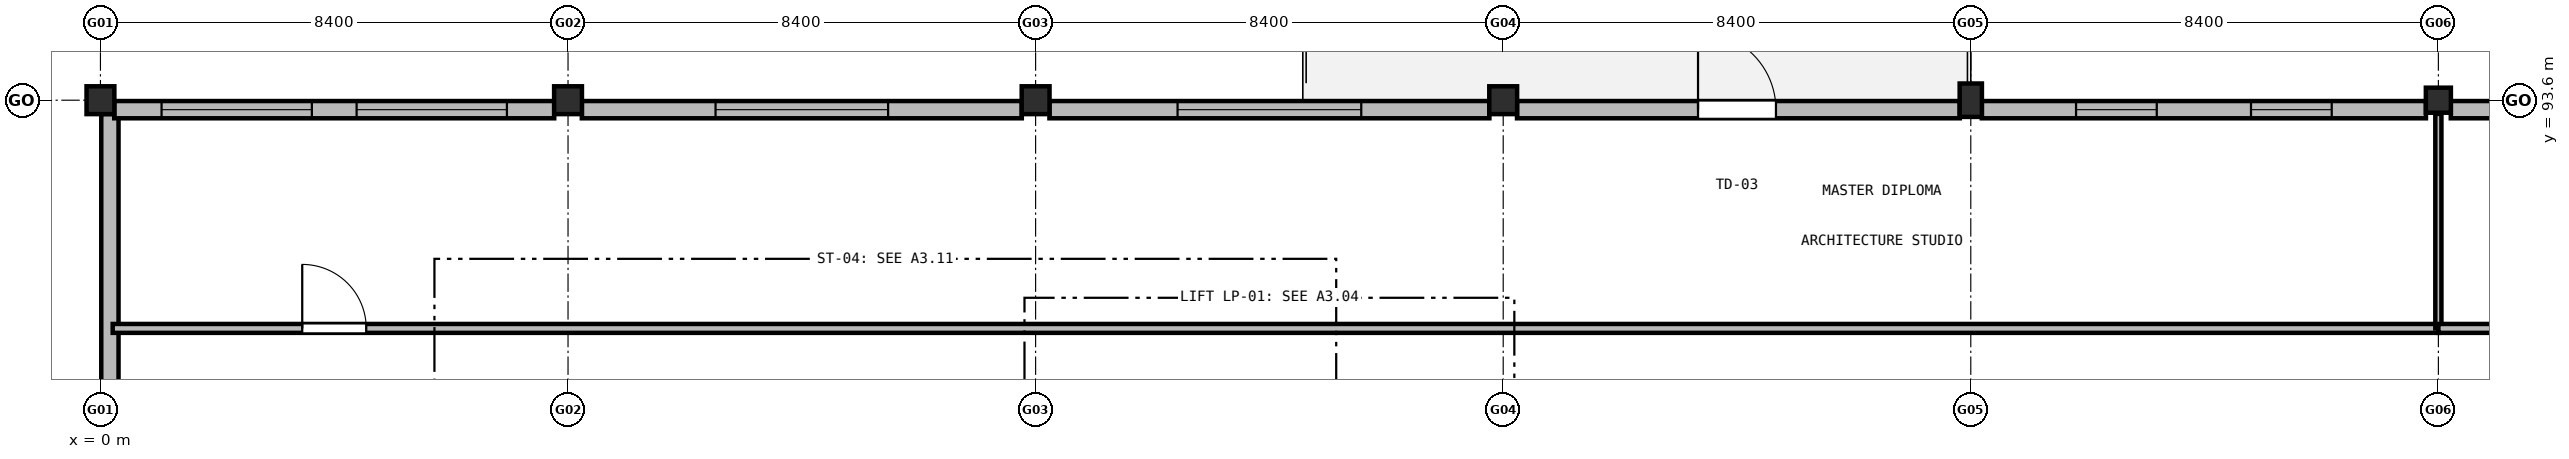
"""IFC4 building model, lengths in metres.
Left out: names, types, materials, properties, quantities, classifications, styles, units other than length and angle.
Written with IfcOpenShell. Run it as: python <this file> out.ifc"""

import sys

from ifc_helpers import new_model, si_unit, direction, frame, frame_2d, origin, origin_2d, place, context, subcontext, project, spatial, rectangle, extrude, element, fill, save


model = new_model("IFC4")
c1 = context("Model", 3, precision=1e-05, world=origin(), true_north=direction((0.0, 1.0)))
c2 = subcontext(c1, "Body", "Model", "MODEL_VIEW")
j1 = project(units=[si_unit("LENGTHUNIT", "METRE"), si_unit("PLANEANGLEUNIT", "RADIAN")], contexts=[c1])
p1 = place(None, origin())
s1 = spatial("IfcSite", under=j1, at=p1, CompositionType="ELEMENT")
p2 = place(p1, origin())
s2 = spatial("IfcBuilding", under=s1, at=p2, CompositionType="ELEMENT")
p3 = place(p2, frame((0.0, 0.0, 17.7)))
s3 = spatial("IfcBuildingStorey", under=s2, at=p3, CompositionType="ELEMENT", Elevation=17.7)
for number, where, z_axis, x_axis in (
    (1, (0.0, 93.6, 0.0), (0.0, 0.0, 1.0), (1.0, 0.0, 0.0)),
    (2, (8.4, 93.6, 0.0), (0.0, 0.0, 1.0), (1.0, 0.0, 0.0)),
    (3, (16.8, 93.6, 0.0), (0.0, 0.0, 1.0), (1.0, 0.0, 0.0)),
    (4, (25.2, 93.6, 0.0), (0.0, 0.0, 1.0), (1.0, 0.0, 0.0)),
):
    element("IfcColumn", number, at=place(p3, frame(where, z_axis=z_axis, x_axis=x_axis)), inside=s3, PredefinedType="COLUMN", context=c2, shape_type="SweptSolid", body=[
        extrude(rectangle(XDim=0.5, YDim=0.5, at=origin_2d()), origin(), (0.0, 0.0, 1.0), 4.2),
    ])
p4 = place(p3, frame((33.6, 93.6, 0.0), z_axis=(0.0, 0.0, 1.0), x_axis=(1.0, 0.0, 0.0)))
e5 = element("IfcColumn", 5, at=p4, inside=s3, PredefinedType="COLUMN", context=c2, shape_type="SweptSolid", body=[
    extrude(rectangle(XDim=0.4, YDim=0.6, at=origin_2d()), origin(), (0.0, 0.0, 1.0), 4.2),
])
p5 = place(p3, frame((42.0, 93.6, 0.0), z_axis=(0.0, 0.0, 1.0), x_axis=(1.0, 0.0, 0.0)))
e6 = element("IfcColumn", 6, at=p5, inside=s3, PredefinedType="COLUMN", context=c2, shape_type="SweptSolid", body=[
    extrude(rectangle(XDim=0.45, YDim=0.45, at=origin_2d()), origin(), (0.0, 0.0, 1.0), 4.2),
])
p6 = place(p3, frame((0.17, 86.648, 0.0), z_axis=(0.0, 0.0, 1.0), x_axis=(0.0, 1.0, 0.0)))
e7 = element("IfcWall", 7, at=p6, inside=s3, PredefinedType="SOLIDWALL", context=c2, shape_type="SweptSolid", body=[
    extrude(rectangle(XDim=6.704, YDim=0.31, at=frame_2d((3.352, 0.0))), origin(), (0.0, 0.0, 1.0), 3.36),
])
p7 = place(p3, frame((0.248, 93.43, 0.0), z_axis=(0.0, 0.0, 1.0), x_axis=(1.0, 0.0, 0.0)))
e8 = element("IfcWall", 8, at=p7, inside=s3, PredefinedType="SOLIDWALL", context=c2, shape_type="SweptSolid", body=[
    extrude(rectangle(XDim=7.904, YDim=0.31, at=frame_2d((3.952, 0.0))), origin(), (0.0, 0.0, 1.0), 3.25),
])
p8 = place(p7, frame((0.85, 0.0, 0.95)))
e9 = element("IfcOpeningElement", 9, at=p8, cuts=e8, PredefinedType="OPENING", context=c2, shape_type="SweptSolid", body=[
    extrude(rectangle(XDim=2.7, YDim=1.9, at=frame_2d((1.35, 0.95))), frame((0.0, 0.165, 0.0), z_axis=(0.0, -1.0, 0.0), x_axis=(1.0, 0.0, 0.0)), (0.0, 0.0, 1.0), 0.33),
])
p9 = place(p7, frame((4.354, 0.0, 0.95)))
e10 = element("IfcOpeningElement", 10, at=p9, cuts=e8, PredefinedType="OPENING", context=c2, shape_type="SweptSolid", body=[
    extrude(rectangle(XDim=2.7, YDim=1.9, at=frame_2d((1.35, 0.95))), frame((0.0, 0.165, 0.0), z_axis=(0.0, -1.0, 0.0), x_axis=(1.0, 0.0, 0.0)), (0.0, 0.0, 1.0), 0.33),
])
p10 = place(p3, frame((8.648, 93.43, 0.0), z_axis=(0.0, 0.0, 1.0), x_axis=(1.0, 0.0, 0.0)))
e11 = element("IfcWall", 11, at=p10, inside=s3, PredefinedType="SOLIDWALL", context=c2, shape_type="SweptSolid", body=[
    extrude(rectangle(XDim=7.904, YDim=0.31, at=frame_2d((3.952, 0.0))), origin(), (0.0, 0.0, 1.0), 3.25),
])
p11 = place(p10, frame((2.402, 0.0, 0.95)))
e12 = element("IfcOpeningElement", 12, at=p11, cuts=e11, PredefinedType="OPENING", context=c2, shape_type="SweptSolid", body=[
    extrude(rectangle(XDim=3.1, YDim=1.95, at=frame_2d((1.55, 0.975))), frame((0.0, 0.165, 0.0), z_axis=(0.0, -1.0, 0.0), x_axis=(1.0, 0.0, 0.0)), (0.0, 0.0, 1.0), 0.33),
])
p12 = place(p3, frame((17.048, 93.43, 0.0), z_axis=(0.0, 0.0, 1.0), x_axis=(1.0, 0.0, 0.0)))
e13 = element("IfcWall", 13, at=p12, inside=s3, PredefinedType="SOLIDWALL", context=c2, shape_type="SweptSolid", body=[
    extrude(rectangle(XDim=7.904, YDim=0.31, at=frame_2d((3.952, 0.0))), origin(), (0.0, 0.0, 1.0), 3.25),
])
p13 = place(p12, frame((2.302, 0.0, 0.95)))
e14 = element("IfcOpeningElement", 14, at=p13, cuts=e13, PredefinedType="OPENING", context=c2, shape_type="SweptSolid", body=[
    extrude(rectangle(XDim=3.3, YDim=1.65, at=frame_2d((1.65, 0.825))), frame((0.0, 0.165, 0.0), z_axis=(0.0, -1.0, 0.0), x_axis=(1.0, 0.0, 0.0)), (0.0, 0.0, 1.0), 0.33),
])
p14 = place(p3, frame((25.448, 93.43, 0.0), z_axis=(0.0, 0.0, 1.0), x_axis=(1.0, 0.0, 0.0)))
e15 = element("IfcWall", 15, at=p14, inside=s3, PredefinedType="SOLIDWALL", context=c2, shape_type="SweptSolid", body=[
    extrude(rectangle(XDim=7.954, YDim=0.31, at=frame_2d((3.977, 0.0))), origin(), (0.0, 0.0, 1.0), 3.25),
])
p15 = place(p14, frame((3.252, 0.0, 0.0)))
e16 = element("IfcOpeningElement", 16, at=p15, cuts=e15, PredefinedType="OPENING", context=c2, shape_type="SweptSolid", body=[
    extrude(rectangle(XDim=1.4, YDim=2.15, at=frame_2d((0.7, 1.075))), frame((0.0, 0.165, 0.0), z_axis=(0.0, -1.0, 0.0), x_axis=(1.0, 0.0, 0.0)), (0.0, 0.0, 1.0), 0.33),
])
p16 = place(p3, frame((33.798, 93.43, 0.0), z_axis=(0.0, 0.0, 1.0), x_axis=(1.0, 0.0, 0.0)))
e17 = element("IfcWall", 17, at=p16, inside=s3, PredefinedType="SOLIDWALL", context=c2, shape_type="SweptSolid", body=[
    extrude(rectangle(XDim=7.979, YDim=0.31, at=frame_2d((3.99, 0.0))), origin(), (0.0, 0.0, 1.0), 3.25),
])
p17 = place(p16, frame((1.693, 0.0, 0.95)))
e18 = element("IfcOpeningElement", 18, at=p17, cuts=e17, PredefinedType="OPENING", context=c2, shape_type="SweptSolid", body=[
    extrude(rectangle(XDim=1.45, YDim=1.85, at=frame_2d((0.725, 0.925))), frame((0.0, 0.165, 0.0), z_axis=(0.0, -1.0, 0.0), x_axis=(1.0, 0.0, 0.0)), (0.0, 0.0, 1.0), 0.33),
])
p18 = place(p16, frame((4.836, 0.0, 0.95)))
e19 = element("IfcOpeningElement", 19, at=p18, cuts=e17, PredefinedType="OPENING", context=c2, shape_type="SweptSolid", body=[
    extrude(rectangle(XDim=1.45, YDim=1.85, at=frame_2d((0.725, 0.925))), frame((0.0, 0.165, 0.0), z_axis=(0.0, -1.0, 0.0), x_axis=(1.0, 0.0, 0.0)), (0.0, 0.0, 1.0), 0.33),
])
p19 = place(p3, frame((42.223, 93.43, 0.0), z_axis=(0.0, 0.0, 1.0), x_axis=(1.0, 0.0, 0.0)))
e20 = element("IfcWall", 20, at=p19, inside=s3, PredefinedType="SOLIDWALL", context=c2, shape_type="SweptSolid", body=[
    extrude(rectangle(XDim=7.954, YDim=0.31, at=frame_2d((3.977, 0.0))), origin(), (0.0, 0.0, 1.0), 3.25),
])
p20 = place(p19, frame((1.051, 0.0, 0.95)))
e21 = element("IfcOpeningElement", 21, at=p20, cuts=e20, PredefinedType="OPENING", context=c2, shape_type="SweptSolid", body=[
    extrude(rectangle(XDim=2.4, YDim=2.05, at=frame_2d((1.2, 1.025))), frame((0.0, 0.165, 0.0), z_axis=(0.0, -1.0, 0.0), x_axis=(1.0, 0.0, 0.0)), (0.0, 0.0, 1.0), 0.33),
])
p21 = place(p19, frame((4.503, 0.0, 0.95)))
e22 = element("IfcOpeningElement", 22, at=p21, cuts=e20, PredefinedType="OPENING", context=c2, shape_type="SweptSolid", body=[
    extrude(rectangle(XDim=2.4, YDim=2.05, at=frame_2d((1.2, 1.025))), frame((0.0, 0.165, 0.0), z_axis=(0.0, -1.0, 0.0), x_axis=(1.0, 0.0, 0.0)), (0.0, 0.0, 1.0), 0.33),
])
p22 = place(p3, frame((0.22, 89.5, 0.0), z_axis=(0.0, 0.0, 1.0), x_axis=(1.0, 0.0, 0.0)))
e23 = element("IfcWall", 23, at=p22, inside=s3, PredefinedType="PARTITIONING", context=c2, shape_type="SweptSolid", body=[
    extrude(rectangle(XDim=41.78, YDim=0.16, at=frame_2d((20.89, 0.0))), origin(), (0.0, 0.0, 1.0), 3.355),
])
p23 = place(p22, frame((3.405, 0.0, 0.0)))
e24 = element("IfcOpeningElement", 24, at=p23, cuts=e23, PredefinedType="OPENING", context=c2, shape_type="SweptSolid", body=[
    extrude(rectangle(XDim=1.15, YDim=2.15, at=frame_2d((0.575, 1.075))), frame((0.0, 0.09, 0.0), z_axis=(0.0, -1.0, 0.0), x_axis=(1.0, 0.0, 0.0)), (0.0, 0.0, 1.0), 0.18),
])
p24 = place(p3, frame((42.0, 89.5, 0.0), z_axis=(0.0, 0.0, 1.0), x_axis=(0.0, 1.0, 0.0)))
e25 = element("IfcWall", 25, at=p24, inside=s3, PredefinedType="PARTITIONING", context=c2, shape_type="SweptSolid", body=[
    extrude(rectangle(XDim=3.855, YDim=0.11, at=frame_2d((1.927, 0.0))), origin(), (0.0, 0.0, 1.0), 3.245),
])
p25 = place(p3, frame((42.0, 89.5, 0.0), z_axis=(0.0, 0.0, 1.0), x_axis=(1.0, 0.0, 0.0)))
e26 = element("IfcWall", 26, at=p25, inside=s3, PredefinedType="PARTITIONING", context=c2, shape_type="SweptSolid", body=[
    extrude(rectangle(XDim=41.78, YDim=0.16, at=frame_2d((20.89, 0.0))), origin(), (0.0, 0.0, 1.0), 3.355),
])
p26 = place(p25, frame((3.375, 0.0, 0.0)))
e27 = element("IfcOpeningElement", 27, at=p26, cuts=e26, PredefinedType="OPENING", context=c2, shape_type="SweptSolid", body=[
    extrude(rectangle(XDim=1.65, YDim=2.2, at=frame_2d((0.825, 1.1))), frame((0.0, 0.09, 0.0), z_axis=(0.0, -1.0, 0.0), x_axis=(1.0, 0.0, 0.0)), (0.0, 0.0, 1.0), 0.18),
])
p27 = place(p8, origin())
e28 = element("IfcWindow", 28, at=p27, inside=s3, PartitioningType="SINGLE_PANEL", PredefinedType="WINDOW", context=c2, shape_type="SweptSolid", body=[
    extrude(rectangle(XDim=2.7, YDim=1.9, at=frame_2d((1.35, 0.95))), frame((0.0, 0.03, 0.0), z_axis=(0.0, -1.0, 0.0), x_axis=(1.0, 0.0, 0.0)), (0.0, 0.0, 1.0), 0.06),
])
fill(e9, e28)
p28 = place(p9, origin())
e29 = element("IfcWindow", 29, at=p28, inside=s3, PartitioningType="SINGLE_PANEL", PredefinedType="WINDOW", context=c2, shape_type="SweptSolid", body=[
    extrude(rectangle(XDim=2.7, YDim=1.9, at=frame_2d((1.35, 0.95))), frame((0.0, 0.03, 0.0), z_axis=(0.0, -1.0, 0.0), x_axis=(1.0, 0.0, 0.0)), (0.0, 0.0, 1.0), 0.06),
])
fill(e10, e29)
p29 = place(p11, origin())
e30 = element("IfcWindow", 30, at=p29, inside=s3, PartitioningType="SINGLE_PANEL", PredefinedType="WINDOW", context=c2, shape_type="SweptSolid", body=[
    extrude(rectangle(XDim=3.1, YDim=1.95, at=frame_2d((1.55, 0.975))), frame((0.0, 0.03, 0.0), z_axis=(0.0, -1.0, 0.0), x_axis=(1.0, 0.0, 0.0)), (0.0, 0.0, 1.0), 0.06),
])
fill(e12, e30)
p30 = place(p13, origin())
e31 = element("IfcWindow", 31, at=p30, inside=s3, PartitioningType="SINGLE_PANEL", PredefinedType="WINDOW", context=c2, shape_type="SweptSolid", body=[
    extrude(rectangle(XDim=3.3, YDim=1.65, at=frame_2d((1.65, 0.825))), frame((0.0, 0.03, 0.0), z_axis=(0.0, -1.0, 0.0), x_axis=(1.0, 0.0, 0.0)), (0.0, 0.0, 1.0), 0.06),
])
fill(e14, e31)
p31 = place(p15, origin())
e32 = element("IfcDoor", 32, at=p31, inside=s3, OperationType="SINGLE_SWING_LEFT", PredefinedType="DOOR", context=c2, shape_type="SweptSolid", body=[
    extrude(rectangle(XDim=1.4, YDim=2.15, at=frame_2d((0.7, 1.075))), frame((0.0, 0.025, 0.0), z_axis=(0.0, -1.0, 0.0), x_axis=(1.0, 0.0, 0.0)), (0.0, 0.0, 1.0), 0.05),
])
fill(e16, e32)
p32 = place(p17, origin())
e33 = element("IfcWindow", 33, at=p32, inside=s3, PartitioningType="SINGLE_PANEL", PredefinedType="WINDOW", context=c2, shape_type="SweptSolid", body=[
    extrude(rectangle(XDim=1.45, YDim=1.85, at=frame_2d((0.725, 0.925))), frame((0.0, 0.03, 0.0), z_axis=(0.0, -1.0, 0.0), x_axis=(1.0, 0.0, 0.0)), (0.0, 0.0, 1.0), 0.06),
])
fill(e18, e33)
p33 = place(p18, origin())
e34 = element("IfcWindow", 34, at=p33, inside=s3, PartitioningType="SINGLE_PANEL", PredefinedType="WINDOW", context=c2, shape_type="SweptSolid", body=[
    extrude(rectangle(XDim=1.45, YDim=1.85, at=frame_2d((0.725, 0.925))), frame((0.0, 0.03, 0.0), z_axis=(0.0, -1.0, 0.0), x_axis=(1.0, 0.0, 0.0)), (0.0, 0.0, 1.0), 0.06),
])
fill(e19, e34)
p34 = place(p23, origin())
e35 = element("IfcDoor", 35, at=p34, inside=s3, OperationType="SINGLE_SWING_LEFT", PredefinedType="DOOR", context=c2, shape_type="SweptSolid", body=[
    extrude(rectangle(XDim=1.15, YDim=2.15, at=frame_2d((0.575, 1.075))), frame((0.0, 0.025, 0.0), z_axis=(0.0, -1.0, 0.0), x_axis=(1.0, 0.0, 0.0)), (0.0, 0.0, 1.0), 0.05),
])
fill(e24, e35)
save(model, sys.argv[1])
